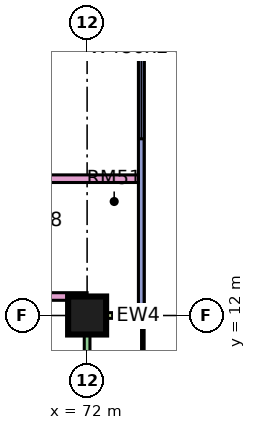
"""IFC4 building model, lengths in metres.
Left out: names, types, materials, properties, quantities, classifications, styles, units other than length and angle.
Written with IfcOpenShell. Run it as: python <this file> out.ifc"""

import sys

from ifc_helpers import new_model, si_unit, direction, frame, frame_2d, origin, origin_2d, place, context, subcontext, project, spatial, rectangle, extrude, element, fill, save


model = new_model("IFC4")
c1 = context("Model", 3, precision=1e-05, world=origin(), true_north=direction((0.0, 1.0)))
c2 = subcontext(c1, "Body", "Model", "MODEL_VIEW")
j1 = project(units=[si_unit("LENGTHUNIT", "METRE"), si_unit("PLANEANGLEUNIT", "RADIAN")], contexts=[c1])
p1 = place(None, origin())
s1 = spatial("IfcSite", under=j1, at=p1, CompositionType="ELEMENT")
p2 = place(p1, origin())
s2 = spatial("IfcBuilding", under=s1, at=p2, CompositionType="ELEMENT")
p3 = place(p2, frame((0.0, 0.0, 125.65)))
s3 = spatial("IfcBuildingStorey", under=s2, at=p3, CompositionType="ELEMENT", Elevation=125.65)
p4 = place(p3, frame((72.0, 12.0, 0.0), z_axis=(0.0, 0.0, 1.0), x_axis=(1.0, 0.0, 0.0)))
e1 = element("IfcColumn", 1, at=p4, inside=s3, PredefinedType="COLUMN", context=c2, shape_type="SweptSolid", body=[
    extrude(rectangle(XDim=1.0, YDim=1.0, at=origin_2d()), origin(), (0.0, 0.0, 1.0), 3.75),
])
p5 = place(p3, frame((72.0, 1.575, 0.0), z_axis=(0.0, 0.0, 1.0), x_axis=(0.0, 1.0, 0.0)))
e2 = element("IfcWall", 2, at=p5, inside=s3, PredefinedType="SOLIDWALL", context=c2, shape_type="SweptSolid", body=[
    extrude(rectangle(XDim=10.35, YDim=0.15, at=frame_2d((5.175, 0.0))), origin(), (0.0, 0.0, 1.0), 3.35),
])
p6 = place(p5, frame((1.562, 0.0, 0.0)))
e3 = element("IfcOpeningElement", 3, at=p6, cuts=e2, PredefinedType="OPENING", context=c2, shape_type="SweptSolid", body=[
    extrude(rectangle(XDim=1.8, YDim=2.4, at=frame_2d((0.9, 1.2))), frame((0.0, 0.085, 0.0), z_axis=(0.0, -1.0, 0.0), x_axis=(1.0, 0.0, 0.0)), (0.0, 0.0, 1.0), 0.17),
])
p7 = place(p5, frame((6.475, 0.0, 0.45)))
e4 = element("IfcOpeningElement", 4, at=p7, cuts=e2, PredefinedType="OPENING", context=c2, shape_type="SweptSolid", body=[
    extrude(rectangle(XDim=3.0, YDim=2.4, at=frame_2d((1.5, 1.2))), frame((0.0, 0.085, 0.0), z_axis=(0.0, -1.0, 0.0), x_axis=(1.0, 0.0, 0.0)), (0.0, 0.0, 1.0), 0.17),
])
p8 = place(p3, frame((73.5, 12.0, 0.0), z_axis=(0.0, 0.0, 1.0), x_axis=(-1.0, 0.0, 0.0)))
e5 = element("IfcWall", 5, at=p8, inside=s3, PredefinedType="SOLIDWALL", context=c2, shape_type="SweptSolid", body=[
    extrude(rectangle(XDim=1.5, YDim=0.15, at=frame_2d((0.75, 0.0))), origin(), (0.0, 0.0, 1.0), 3.35),
])
p9 = place(p3, frame((73.425, 12.075, 0.0), z_axis=(0.0, 0.0, 1.0), x_axis=(0.0, 1.0, 0.0)))
e6 = element("IfcWall", 6, at=p9, inside=s3, PredefinedType="SOLIDWALL", context=c2, shape_type="SweptSolid", body=[
    extrude(rectangle(XDim=10.425, YDim=0.15, at=frame_2d((5.212, 0.0))), origin(), (0.0, 0.0, 1.0), 3.35),
])
p10 = place(p9, frame((4.575, 0.0, 0.45)))
e7 = element("IfcOpeningElement", 7, at=p10, cuts=e6, PredefinedType="OPENING", context=c2, shape_type="SweptSolid", body=[
    extrude(rectangle(XDim=4.8, YDim=2.4, at=frame_2d((2.4, 1.2))), frame((0.0, 0.085, 0.0), z_axis=(0.0, -1.0, 0.0), x_axis=(1.0, 0.0, 0.0)), (0.0, 0.0, 1.0), 0.17),
])
p11 = place(p3, frame((40.65, 12.5, 0.0), z_axis=(0.0, 0.0, 1.0), x_axis=(1.0, 0.0, 0.0)))
e8 = element("IfcWall", 8, at=p11, inside=s3, PredefinedType="PARTITIONING", context=c2, shape_type="SweptSolid", body=[
    extrude(rectangle(XDim=31.35, YDim=0.2, at=frame_2d((15.675, 0.0))), origin(), (0.0, 0.0, 1.0), 3.35),
])
p12 = place(p11, frame((20.1, 0.0, 0.0)))
e9 = element("IfcOpeningElement", 9, at=p12, cuts=e8, PredefinedType="OPENING", context=c2, shape_type="SweptSolid", body=[
    extrude(rectangle(XDim=1.0, YDim=2.1, at=frame_2d((0.5, 1.05))), frame((0.0, 0.11, 0.0), z_axis=(0.0, -1.0, 0.0), x_axis=(1.0, 0.0, 0.0)), (0.0, 0.0, 1.0), 0.22),
])
p13 = place(p11, frame((1.05, 0.0, 0.0)))
e10 = element("IfcOpeningElement", 10, at=p13, cuts=e8, PredefinedType="OPENING", context=c2, shape_type="SweptSolid", body=[
    extrude(rectangle(XDim=1.0, YDim=2.1, at=frame_2d((0.5, 1.05))), frame((0.0, 0.11, 0.0), z_axis=(0.0, -1.0, 0.0), x_axis=(1.0, 0.0, 0.0)), (0.0, 0.0, 1.0), 0.22),
])
p14 = place(p3, frame((51.225, 15.6, 0.0), z_axis=(0.0, 0.0, 1.0), x_axis=(1.0, 0.0, 0.0)))
e11 = element("IfcWall", 11, at=p14, inside=s3, PredefinedType="PARTITIONING", context=c2, shape_type="SweptSolid", body=[
    extrude(rectangle(XDim=22.125, YDim=0.2, at=frame_2d((11.062, 0.0))), origin(), (0.0, 0.0, 1.0), 3.35),
])
p15 = place(p14, frame((18.725, 0.0, 0.0)))
e12 = element("IfcOpeningElement", 12, at=p15, cuts=e11, PredefinedType="OPENING", context=c2, shape_type="SweptSolid", body=[
    extrude(rectangle(XDim=1.0, YDim=2.1, at=frame_2d((0.5, 1.05))), frame((0.0, 0.11, 0.0), z_axis=(0.0, -1.0, 0.0), x_axis=(1.0, 0.0, 0.0)), (0.0, 0.0, 1.0), 0.22),
])
p16 = place(p14, frame((0.875, 0.0, 0.0)))
e13 = element("IfcOpeningElement", 13, at=p16, cuts=e11, PredefinedType="OPENING", context=c2, shape_type="SweptSolid", body=[
    extrude(rectangle(XDim=1.0, YDim=2.1, at=frame_2d((0.5, 1.05))), frame((0.0, 0.11, 0.0), z_axis=(0.0, -1.0, 0.0), x_axis=(1.0, 0.0, 0.0)), (0.0, 0.0, 1.0), 0.22),
])
p17 = place(p10, origin())
e14 = element("IfcWindow", 14, at=p17, inside=s3, PartitioningType="SINGLE_PANEL", PredefinedType="WINDOW", context=c2, shape_type="SweptSolid", body=[
    extrude(rectangle(XDim=4.8, YDim=2.4, at=frame_2d((2.4, 1.2))), frame((0.0, 0.03, 0.0), z_axis=(0.0, -1.0, 0.0), x_axis=(1.0, 0.0, 0.0)), (0.0, 0.0, 1.0), 0.06),
])
fill(e7, e14)
save(model, sys.argv[1])
